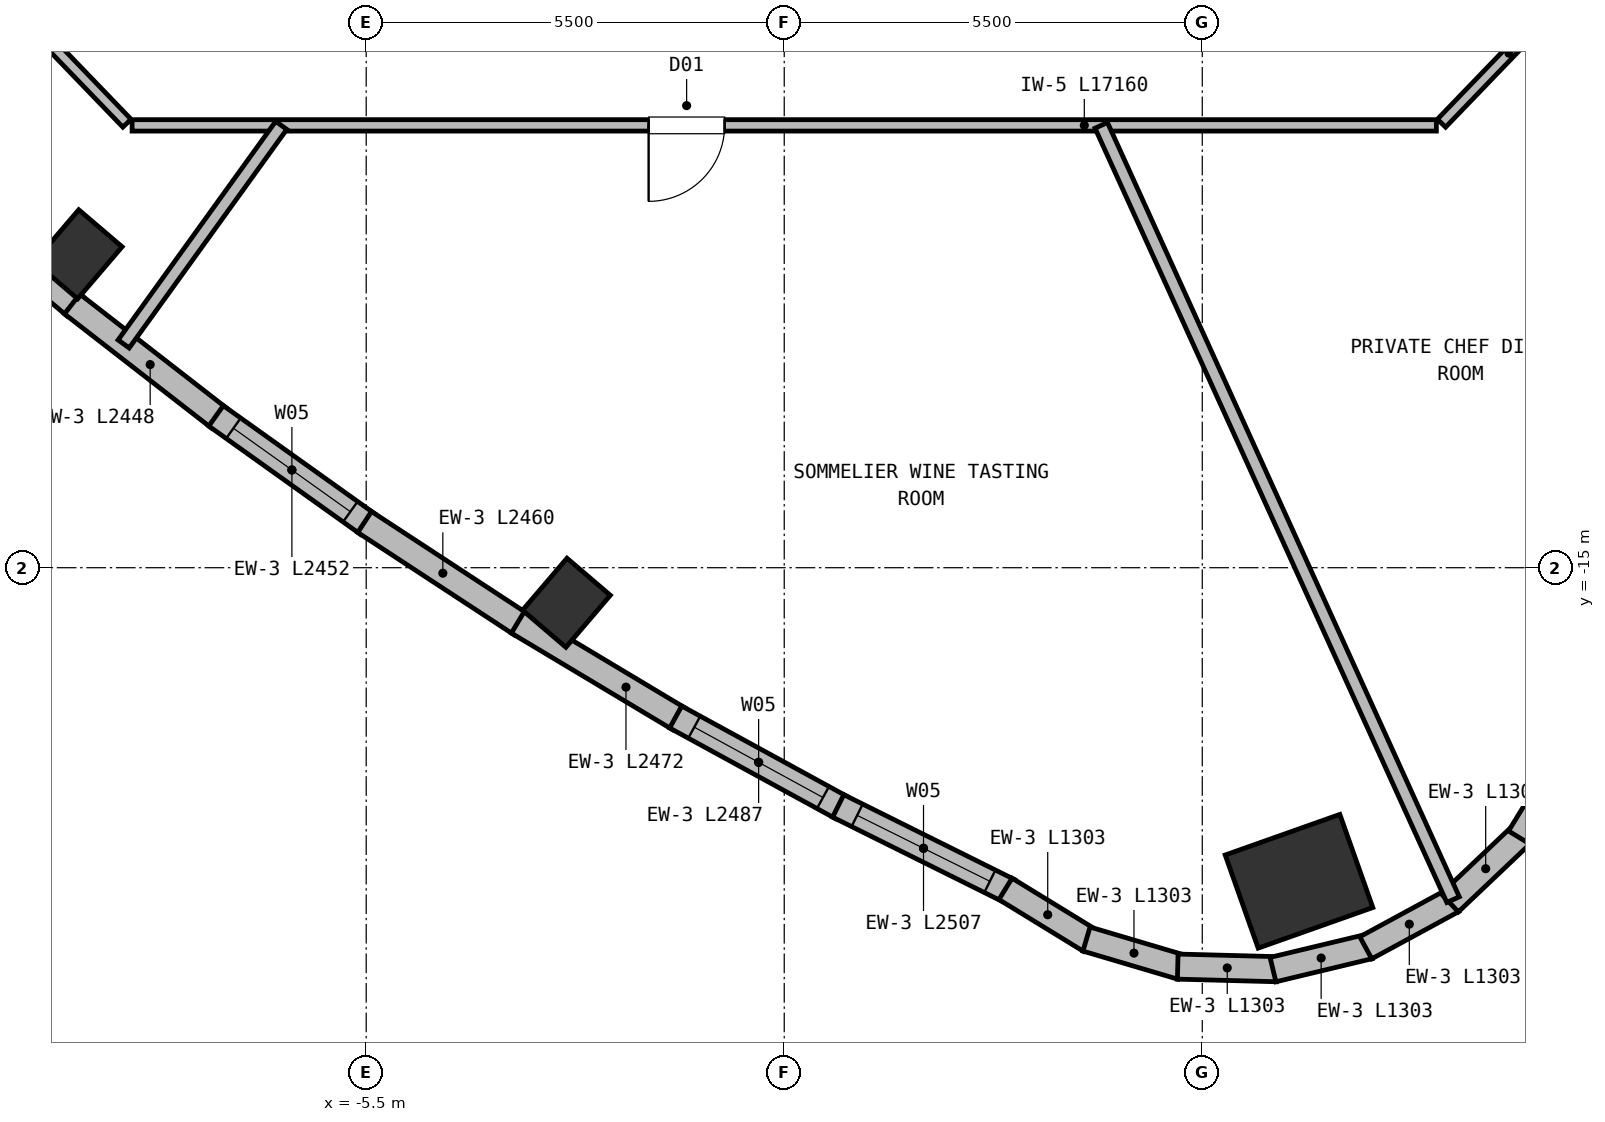
"""IFC4 building model, lengths in metres.
Left out: names, types, materials, properties, quantities, classifications, styles, units other than length and angle.
Written with IfcOpenShell. Run it as: python <this file> out.ifc"""

import sys

from ifc_helpers import new_model, si_unit, direction, frame, frame_2d, origin, origin_2d, place, context, subcontext, project, spatial, rectangle, extrude, element, fill, save


model = new_model("IFC4")
c1 = context("Model", 3, precision=1e-05, world=origin(), true_north=direction((0.0, 1.0)))
c2 = subcontext(c1, "Body", "Model", "MODEL_VIEW")
j1 = project(units=[si_unit("LENGTHUNIT", "METRE"), si_unit("PLANEANGLEUNIT", "RADIAN")], contexts=[c1])
p1 = place(None, origin())
s1 = spatial("IfcSite", under=j1, at=p1, CompositionType="ELEMENT")
p2 = place(p1, origin())
s2 = spatial("IfcBuilding", under=s1, at=p2, CompositionType="ELEMENT")
p3 = place(p2, frame((0.0, 0.0, 272.8)))
s3 = spatial("IfcBuildingStorey", under=s2, at=p3, CompositionType="ELEMENT", Elevation=272.8)
for number, where, z_axis, x_axis in (
    (1, (-9.289, -10.876, 0.0), (0.0, 0.0, 1.0), (-0.76, 0.649, 0.0)),
    (2, (-2.865, -15.461, 0.0), (0.0, 0.0, 1.0), (-0.76, 0.649, 0.0)),
):
    element("IfcColumn", number, at=place(p3, frame(where, z_axis=z_axis, x_axis=x_axis)), inside=s3, PredefinedType="COLUMN", context=c2, shape_type="SweptSolid", body=[
        extrude(rectangle(XDim=0.75, YDim=0.9, at=origin_2d()), origin(), (0.0, 0.0, 1.0), 4.4),
    ])
p4 = place(p3, frame((6.773, -19.126, 0.0), z_axis=(0.0, 0.0, 1.0), x_axis=(-0.333806859234, 0.942641491092, 0.0)))
e3 = element("IfcColumn", 3, at=p4, inside=s3, PredefinedType="COLUMN", context=c2, shape_type="SweptSolid", body=[
    extrude(rectangle(XDim=1.3, YDim=1.6, at=origin_2d()), origin(), (0.0, 0.0, 1.0), 4.4),
])
p5 = place(p3, frame((-9.33, -11.561, 0.0), z_axis=(0.0, 0.0, 1.0), x_axis=(-0.764225429478, 0.644949217334, 0.0)))
e4 = element("IfcWall", 4, at=p5, inside=s3, PredefinedType="SOLIDWALL", context=c2, shape_type="SweptSolid", body=[
    extrude(rectangle(XDim=2.448, YDim=0.33, at=frame_2d((1.224, 0.0))), origin(), (0.0, 0.0, 1.0), 4.15),
])
p6 = place(p3, frame((-7.435, -13.031, 0.0), z_axis=(0.0, 0.0, 1.0), x_axis=(-0.789786954421, 0.613381257152, 0.0)))
e5 = element("IfcWall", 5, at=p6, inside=s3, PredefinedType="SOLIDWALL", context=c2, shape_type="SweptSolid", body=[
    extrude(rectangle(XDim=2.448, YDim=0.33, at=frame_2d((1.224, 0.0))), origin(), (0.0, 0.0, 1.0), 4.15),
])
p7 = place(p3, frame((-5.48, -14.427, 0.0), z_axis=(0.0, 0.0, 1.0), x_axis=(-0.813854547638, 0.581068649378, 0.0)))
e6 = element("IfcWall", 6, at=p7, inside=s3, PredefinedType="SOLIDWALL", context=c2, shape_type="SweptSolid", body=[
    extrude(rectangle(XDim=2.452, YDim=0.33, at=frame_2d((1.226, 0.0))), origin(), (0.0, 0.0, 1.0), 4.15),
])
p8 = place(p7, frame((0.281, 0.0, 0.72)))
e7 = element("IfcOpeningElement", 7, at=p8, cuts=e6, PredefinedType="OPENING", context=c2, shape_type="SweptSolid", body=[
    extrude(rectangle(XDim=1.89, YDim=2.15, at=frame_2d((0.945, 1.075))), frame((0.0, 0.175, 0.0), z_axis=(0.0, -1.0, 0.0), x_axis=(1.0, 0.0, 0.0)), (0.0, 0.0, 1.0), 0.35),
])
p9 = place(p3, frame((-3.463, -15.746, 0.0), z_axis=(0.0, 0.0, 1.0), x_axis=(-0.8366477668, 0.547741284101, 0.0)))
e8 = element("IfcWall", 8, at=p9, inside=s3, PredefinedType="SOLIDWALL", context=c2, shape_type="SweptSolid", body=[
    extrude(rectangle(XDim=2.46, YDim=0.33, at=frame_2d((1.23, 0.0))), origin(), (0.0, 0.0, 1.0), 4.15),
])
p10 = place(p3, frame((-1.385, -16.989, 0.0), z_axis=(0.0, 0.0, 1.0), x_axis=(-0.857841338579, 0.513914621143, 0.0)))
e9 = element("IfcWall", 9, at=p10, inside=s3, PredefinedType="SOLIDWALL", context=c2, shape_type="SweptSolid", body=[
    extrude(rectangle(XDim=2.472, YDim=0.33, at=frame_2d((1.236, 0.0))), origin(), (0.0, 0.0, 1.0), 4.15),
])
p11 = place(p3, frame((0.754, -18.157, 0.0), z_axis=(0.0, 0.0, 1.0), x_axis=(-0.877475074231, 0.479622241044, 0.0)))
e10 = element("IfcWall", 10, at=p11, inside=s3, PredefinedType="SOLIDWALL", context=c2, shape_type="SweptSolid", body=[
    extrude(rectangle(XDim=2.487, YDim=0.33, at=frame_2d((1.244, 0.0))), origin(), (0.0, 0.0, 1.0), 4.15),
])
p12 = place(p11, frame((0.279, 0.0, 0.72)))
e11 = element("IfcOpeningElement", 11, at=p12, cuts=e10, PredefinedType="OPENING", context=c2, shape_type="SweptSolid", body=[
    extrude(rectangle(XDim=1.93, YDim=2.15, at=frame_2d((0.965, 1.075))), frame((0.0, 0.175, 0.0), z_axis=(0.0, -1.0, 0.0), x_axis=(1.0, 0.0, 0.0)), (0.0, 0.0, 1.0), 0.35),
])
p13 = place(p3, frame((2.955, -19.25, 0.0), z_axis=(0.0, 0.0, 1.0), x_axis=(-0.895515434076, 0.445030456634, 0.0)))
e12 = element("IfcWall", 12, at=p13, inside=s3, PredefinedType="SOLIDWALL", context=c2, shape_type="SweptSolid", body=[
    extrude(rectangle(XDim=2.507, YDim=0.33, at=frame_2d((1.253, 0.0))), origin(), (0.0, 0.0, 1.0), 4.15),
])
p14 = place(p13, frame((0.278, 0.0, 0.72)))
e13 = element("IfcOpeningElement", 13, at=p14, cuts=e12, PredefinedType="OPENING", context=c2, shape_type="SweptSolid", body=[
    extrude(rectangle(XDim=1.95, YDim=2.15, at=frame_2d((0.975, 1.075))), frame((0.0, 0.175, 0.0), z_axis=(0.0, -1.0, 0.0), x_axis=(1.0, 0.0, 0.0)), (0.0, 0.0, 1.0), 0.35),
])
for number, where, z_axis, x_axis in (
    (14, (4.022, -19.906, 0.0), (0.0, 0.0, 1.0), (-0.853, 0.523, 0.0)),
    (15, (5.226, -20.256, 0.0), (0.0, 0.0, 1.0), (-0.959, 0.284, 0.0)),
):
    element("IfcWall", number, at=place(p3, frame(where, z_axis=z_axis, x_axis=x_axis)), inside=s3, PredefinedType="SOLIDWALL", context=c2, shape_type="SweptSolid", body=[
        extrude(rectangle(XDim=1.303, YDim=0.33, at=frame_2d((0.652, 0.0))), origin(), (0.0, 0.0, 1.0), 4.15),
    ])
for number, where, z_axis, x_axis in (
    (16, (6.48, -20.283, 0.0), (0.0, 0.0, 1.0), (-1.0, 0.026, 0.0)),
    (17, (7.698, -19.984, 0.0), (0.0, 0.0, 1.0), (-0.972, -0.233, 0.0)),
    (18, (8.796, -19.38, 0.0), (0.0, 0.0, 1.0), (-0.879, -0.477, 0.0)),
):
    element("IfcWall", number, at=place(p3, frame(where, z_axis=z_axis, x_axis=x_axis)), inside=s3, PredefinedType="SOLIDWALL", context=c2, shape_type="SweptSolid", body=[
        extrude(rectangle(XDim=1.303, YDim=0.33, at=frame_2d((0.651, 0.0))), origin(), (0.0, 0.0, 1.0), 4.15),
    ])
p15 = place(p3, frame((9.701, -18.512, 0.0), z_axis=(0.0, 0.0, 1.0), x_axis=(-0.725415712612, -0.688311008118, 0.0)))
e19 = element("IfcWall", 19, at=p15, inside=s3, PredefinedType="SOLIDWALL", context=c2, shape_type="SweptSolid", body=[
    extrude(rectangle(XDim=1.303, YDim=0.33, at=frame_2d((0.651, 0.0))), origin(), (0.0, 0.0, 1.0), 4.15),
])
p16 = place(p3, frame((10.351, -17.439, 0.0), z_axis=(0.0, 0.0, 1.0), x_axis=(-0.522601602676, -0.852577014047, 0.0)))
e20 = element("IfcWall", 20, at=p16, inside=s3, PredefinedType="SOLIDWALL", context=c2, shape_type="SweptSolid", body=[
    extrude(rectangle(XDim=1.303, YDim=0.33, at=frame_2d((0.651, 0.0))), origin(), (0.0, 0.0, 1.0), 4.15),
])
p17 = place(p3, frame((8.58, -9.18, 0.0), z_axis=(0.0, 0.0, 1.0), x_axis=(-1.0, 0.0, 0.0)))
e21 = element("IfcWall", 21, at=p17, inside=s3, PredefinedType="PARTITIONING", context=c2, shape_type="SweptSolid", body=[
    extrude(rectangle(XDim=17.16, YDim=0.15, at=frame_2d((8.58, 0.0))), origin(), (0.0, 0.0, 1.0), 3.86),
])
p18 = place(p17, frame((9.364, 0.0, 0.0)))
e22 = element("IfcOpeningElement", 22, at=p18, cuts=e21, PredefinedType="OPENING", context=c2, shape_type="SweptSolid", body=[
    extrude(rectangle(XDim=1.0, YDim=2.15, at=frame_2d((0.5, 1.075))), frame((0.0, 0.085, 0.0), z_axis=(0.0, -1.0, 0.0), x_axis=(1.0, 0.0, 0.0)), (0.0, 0.0, 1.0), 0.17),
])
for number, where, z_axis, x_axis in (
    (23, (10.422, -7.309, 0.0), (0.0, 0.0, 1.0), (-0.694, -0.72, 0.0)),
    (24, (-8.648, -9.151, 0.0), (0.0, 0.0, 1.0), (-0.694, 0.72, 0.0)),
):
    element("IfcWall", number, at=place(p3, frame(where, z_axis=z_axis, x_axis=x_axis)), inside=s3, PredefinedType="PARTITIONING", context=c2, shape_type="SweptSolid", body=[
        extrude(rectangle(XDim=2.558, YDim=0.15, at=frame_2d((1.279, 0.0))), origin(), (0.0, 0.0, 1.0), 4.15),
    ])
p19 = place(p3, frame((-6.618, -9.18, 0.0), z_axis=(0.0, 0.0, 1.0), x_axis=(-0.584788931395, -0.811185494026, 0.0)))
e25 = element("IfcWall", 25, at=p19, inside=s3, PredefinedType="PARTITIONING", context=c2, shape_type="SweptSolid", body=[
    extrude(rectangle(XDim=3.546, YDim=0.18, at=frame_2d((1.773, 0.0))), origin(), (0.0, 0.0, 1.0), 4.15),
])
p20 = place(p3, frame((4.171, -9.18, 0.0), z_axis=(0.0, 0.0, 1.0), x_axis=(0.413663216612, -0.910429977111, 0.0)))
e26 = element("IfcWall", 26, at=p20, inside=s3, PredefinedType="PARTITIONING", context=c2, shape_type="SweptSolid", body=[
    extrude(rectangle(XDim=11.19, YDim=0.18, at=frame_2d((5.595, 0.0))), origin(), (0.0, 0.0, 1.0), 4.15),
])
p21 = place(p8, origin())
e27 = element("IfcWindow", 27, at=p21, inside=s3, PartitioningType="SINGLE_PANEL", PredefinedType="WINDOW", context=c2, shape_type="SweptSolid", body=[
    extrude(rectangle(XDim=1.89, YDim=2.15, at=frame_2d((0.945, 1.075))), frame((0.0, 0.03, 0.0), z_axis=(0.0, -1.0, 0.0), x_axis=(1.0, 0.0, 0.0)), (0.0, 0.0, 1.0), 0.06),
])
fill(e7, e27)
p22 = place(p12, origin())
e28 = element("IfcWindow", 28, at=p22, inside=s3, PartitioningType="SINGLE_PANEL", PredefinedType="WINDOW", context=c2, shape_type="SweptSolid", body=[
    extrude(rectangle(XDim=1.93, YDim=2.15, at=frame_2d((0.965, 1.075))), frame((0.0, 0.03, 0.0), z_axis=(0.0, -1.0, 0.0), x_axis=(1.0, 0.0, 0.0)), (0.0, 0.0, 1.0), 0.06),
])
fill(e11, e28)
p23 = place(p14, origin())
e29 = element("IfcWindow", 29, at=p23, inside=s3, PartitioningType="SINGLE_PANEL", PredefinedType="WINDOW", context=c2, shape_type="SweptSolid", body=[
    extrude(rectangle(XDim=1.95, YDim=2.15, at=frame_2d((0.975, 1.075))), frame((0.0, 0.03, 0.0), z_axis=(0.0, -1.0, 0.0), x_axis=(1.0, 0.0, 0.0)), (0.0, 0.0, 1.0), 0.06),
])
fill(e13, e29)
p24 = place(p18, origin())
e30 = element("IfcDoor", 30, at=p24, inside=s3, OperationType="SINGLE_SWING_RIGHT", PredefinedType="DOOR", context=c2, shape_type="SweptSolid", body=[
    extrude(rectangle(XDim=1.0, YDim=2.15, at=frame_2d((0.5, 1.075))), frame((0.0, 0.025, 0.0), z_axis=(0.0, -1.0, 0.0), x_axis=(1.0, 0.0, 0.0)), (0.0, 0.0, 1.0), 0.05),
])
fill(e22, e30)
save(model, sys.argv[1])
